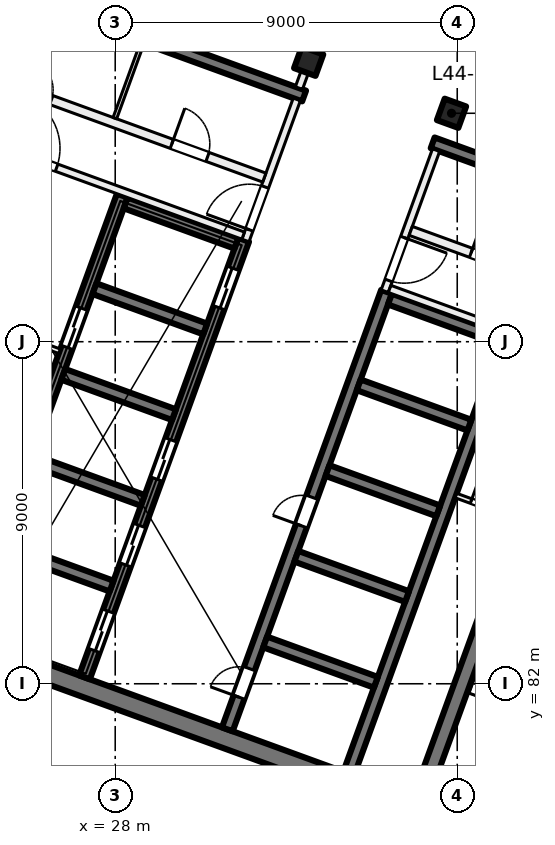
"""IFC4 building model, lengths in metres.
Left out: names, types, materials, properties, quantities, classifications, styles, units other than length and angle.
Written with IfcOpenShell. Run it as: python <this file> out.ifc"""

import sys

from ifc_helpers import new_model, si_unit, direction, frame, frame_2d, origin, origin_2d, place, context, subcontext, project, spatial, rectangle, extrude, element, fill, save


model = new_model("IFC4")
c1 = context("Model", 3, precision=1e-05, world=origin(), true_north=direction((0.0, 1.0)))
c2 = subcontext(c1, "Body", "Model", "MODEL_VIEW")
j1 = project(units=[si_unit("LENGTHUNIT", "METRE"), si_unit("PLANEANGLEUNIT", "RADIAN")], contexts=[c1])
p1 = place(None, origin())
s1 = spatial("IfcSite", under=j1, at=p1, CompositionType="ELEMENT")
p2 = place(p1, origin())
s2 = spatial("IfcBuilding", under=s1, at=p2, CompositionType="ELEMENT")
p3 = place(p2, frame((0.0, 0.0, 188.0)))
s3 = spatial("IfcBuildingStorey", under=s2, at=p3, CompositionType="ELEMENT", Elevation=188.0)
for number, where, z_axis, x_axis in (
    (1, (36.849, 97.011, 0.0), (0.0, 0.0, 1.0), (-0.342, -0.94, 0.0)),
    (2, (33.091, 98.379, 0.0), (0.0, 0.0, 1.0), (-0.342, -0.94, 0.0)),
):
    element("IfcColumn", number, at=place(p3, frame(where, z_axis=z_axis, x_axis=x_axis)), inside=s3, PredefinedType="COLUMN", context=c2, shape_type="SweptSolid", body=[
        extrude(rectangle(XDim=0.6, YDim=0.6, at=origin_2d()), origin(), (0.0, 0.0, 1.0), 4.0),
    ])
p4 = place(p3, frame((35.75, 78.788, 0.0), z_axis=(0.0, 0.0, 1.0), x_axis=(-0.939692894512, 0.342019391267, 0.0)))
e3 = element("IfcWall", 3, at=p4, inside=s3, PredefinedType="SHEAR", context=c2, shape_type="SweptSolid", body=[
    extrude(rectangle(XDim=14.4, YDim=0.5, at=frame_2d((7.2, 0.0))), origin(), (0.0, 0.0, 1.0), 4.0),
])
p5 = place(p3, frame((36.058, 79.048, 0.0), z_axis=(0.0, 0.0, 1.0), x_axis=(0.342016982193, 0.939693771338, 0.0)))
e4 = element("IfcWall", 4, at=p5, inside=s3, PredefinedType="SHEAR", context=c2, shape_type="SweptSolid", body=[
    extrude(rectangle(XDim=7.8, YDim=0.4, at=frame_2d((3.9, 0.0))), origin(), (0.0, 0.0, 1.0), 4.0),
])
p6 = place(p3, frame((30.949, 80.801, 0.0), z_axis=(0.0, 0.0, 1.0), x_axis=(0.342016684409, 0.939693879721, 0.0)))
e5 = element("IfcWall", 5, at=p6, inside=s3, PredefinedType="SHEAR", context=c2, shape_type="SweptSolid", body=[
    extrude(rectangle(XDim=12.25, YDim=0.3, at=frame_2d((6.125, 0.0))), origin(), (0.0, 0.0, 1.0), 4.0),
])
p7 = place(p6, frame((0.9, 0.0, 0.0)))
e6 = element("IfcOpeningElement", 6, at=p7, cuts=e5, PredefinedType="OPENING", context=c2, shape_type="SweptSolid", body=[
    extrude(rectangle(XDim=0.8, YDim=2.1, at=frame_2d((0.4, 1.05))), frame((0.0, 0.16, 0.0), z_axis=(0.0, -1.0, 0.0), x_axis=(1.0, 0.0, 0.0)), (0.0, 0.0, 1.0), 0.32),
])
p8 = place(p6, frame((5.7, 0.0, 0.0)))
e7 = element("IfcOpeningElement", 7, at=p8, cuts=e5, PredefinedType="OPENING", context=c2, shape_type="SweptSolid", body=[
    extrude(rectangle(XDim=0.8, YDim=2.1, at=frame_2d((0.4, 1.05))), frame((0.0, 0.16, 0.0), z_axis=(0.0, -1.0, 0.0), x_axis=(1.0, 0.0, 0.0)), (0.0, 0.0, 1.0), 0.32),
])
p9 = place(p3, frame((34.144, 79.638, 0.0), z_axis=(0.0, 0.0, 1.0), x_axis=(0.342016684409, 0.939693879721, 0.0)))
e8 = element("IfcWall", 8, at=p9, inside=s3, PredefinedType="SHEAR", context=c2, shape_type="SweptSolid", body=[
    extrude(rectangle(XDim=12.25, YDim=0.3, at=frame_2d((6.125, 0.0))), origin(), (0.0, 0.0, 1.0), 4.0),
])
p10 = place(p3, frame((34.858, 82.039, 0.0), z_axis=(0.0, 0.0, 1.0), x_axis=(-0.939689908313, 0.342027595692, 0.0)))
e9 = element("IfcWall", 9, at=p10, inside=s3, PredefinedType="SHEAR", context=c2, shape_type="SweptSolid", body=[
    extrude(rectangle(XDim=3.1, YDim=0.3, at=frame_2d((1.55, 0.0))), origin(), (0.0, 0.0, 1.0), 4.0),
])
p11 = place(p3, frame((35.679, 84.294, 0.0), z_axis=(0.0, 0.0, 1.0), x_axis=(-0.939706007505, 0.341983361377, 0.0)))
e10 = element("IfcWall", 10, at=p11, inside=s3, PredefinedType="SHEAR", context=c2, shape_type="SweptSolid", body=[
    extrude(rectangle(XDim=3.1, YDim=0.3, at=frame_2d((1.55, 0.0))), origin(), (0.0, 0.0, 1.0), 4.0),
])
for number, where, z_axis, x_axis in (
    (11, (36.5, 86.549, 0.0), (0.0, 0.0, 1.0), (-0.94, 0.342, 0.0)),
    (12, (37.321, 88.805, 0.0), (0.0, 0.0, 1.0), (-0.94, 0.342, 0.0)),
    (13, (38.142, 91.06, 0.0), (0.0, 0.0, 1.0), (-0.94, 0.342, 0.0)),
):
    element("IfcWall", number, at=place(p3, frame(where, z_axis=z_axis, x_axis=x_axis)), inside=s3, PredefinedType="SHEAR", context=c2, shape_type="SweptSolid", body=[
        extrude(rectangle(XDim=3.1, YDim=0.3, at=frame_2d((1.55, 0.0))), origin(), (0.0, 0.0, 1.0), 4.0),
    ])
p12 = place(p3, frame((27.191, 82.169, 0.0), z_axis=(0.0, 0.0, 1.0), x_axis=(0.342016684409, 0.939693879721, 0.0)))
e14 = element("IfcWall", 14, at=p12, inside=s3, PredefinedType="SHEAR", context=c2, shape_type="SweptSolid", body=[
    extrude(rectangle(XDim=12.25, YDim=0.3, at=frame_2d((6.125, 0.0))), origin(), (0.0, 0.0, 1.0), 4.0),
])
p13 = place(p12, frame((0.75, 0.0, 0.0)))
e15 = element("IfcOpeningElement", 15, at=p13, cuts=e14, PredefinedType="OPENING", context=c2, shape_type="SweptSolid", body=[
    extrude(rectangle(XDim=1.1, YDim=2.1, at=frame_2d((0.55, 1.05))), frame((0.0, 0.16, 0.0), z_axis=(0.0, -1.0, 0.0), x_axis=(1.0, 0.0, 0.0)), (0.0, 0.0, 1.0), 0.32),
])
p14 = place(p12, frame((3.15, 0.0, 0.0)))
e16 = element("IfcOpeningElement", 16, at=p14, cuts=e14, PredefinedType="OPENING", context=c2, shape_type="SweptSolid", body=[
    extrude(rectangle(XDim=1.1, YDim=2.1, at=frame_2d((0.55, 1.05))), frame((0.0, 0.16, 0.0), z_axis=(0.0, -1.0, 0.0), x_axis=(1.0, 0.0, 0.0)), (0.0, 0.0, 1.0), 0.32),
])
p15 = place(p12, frame((5.55, 0.0, 0.0)))
e17 = element("IfcOpeningElement", 17, at=p15, cuts=e14, PredefinedType="OPENING", context=c2, shape_type="SweptSolid", body=[
    extrude(rectangle(XDim=1.1, YDim=2.1, at=frame_2d((0.55, 1.05))), frame((0.0, 0.16, 0.0), z_axis=(0.0, -1.0, 0.0), x_axis=(1.0, 0.0, 0.0)), (0.0, 0.0, 1.0), 0.32),
])
p16 = place(p12, frame((10.35, 0.0, 0.0)))
e18 = element("IfcOpeningElement", 18, at=p16, cuts=e14, PredefinedType="OPENING", context=c2, shape_type="SweptSolid", body=[
    extrude(rectangle(XDim=1.1, YDim=2.1, at=frame_2d((0.55, 1.05))), frame((0.0, 0.16, 0.0), z_axis=(0.0, -1.0, 0.0), x_axis=(1.0, 0.0, 0.0)), (0.0, 0.0, 1.0), 0.32),
])
p17 = place(p3, frame((23.996, 83.332, 0.0), z_axis=(0.0, 0.0, 1.0), x_axis=(0.342016684409, 0.939693879721, 0.0)))
e19 = element("IfcWall", 19, at=p17, inside=s3, PredefinedType="SHEAR", context=c2, shape_type="SweptSolid", body=[
    extrude(rectangle(XDim=12.25, YDim=0.3, at=frame_2d((6.125, 0.0))), origin(), (0.0, 0.0, 1.0), 4.0),
])
p18 = place(p17, frame((8.0, 0.0, 0.0)))
e20 = element("IfcOpeningElement", 20, at=p18, cuts=e19, PredefinedType="OPENING", context=c2, shape_type="SweptSolid", body=[
    extrude(rectangle(XDim=1.1, YDim=2.1, at=frame_2d((0.55, 1.05))), frame((0.0, 0.16, 0.0), z_axis=(0.0, -1.0, 0.0), x_axis=(1.0, 0.0, 0.0)), (0.0, 0.0, 1.0), 0.32),
])
for number, where, z_axis, x_axis in (
    (21, (27.905, 84.57, 0.0), (0.0, 0.0, 1.0), (-0.94, 0.342, 0.0)),
    (22, (28.726, 86.825, 0.0), (0.0, 0.0, 1.0), (-0.94, 0.342, 0.0)),
    (23, (29.546, 89.08, 0.0), (0.0, 0.0, 1.0), (-0.94, 0.342, 0.0)),
):
    element("IfcWall", number, at=place(p3, frame(where, z_axis=z_axis, x_axis=x_axis)), inside=s3, PredefinedType="SHEAR", context=c2, shape_type="SweptSolid", body=[
        extrude(rectangle(XDim=3.1, YDim=0.3, at=frame_2d((1.55, 0.0))), origin(), (0.0, 0.0, 1.0), 4.0),
    ])
for number, where, z_axis, x_axis in (
    (24, (30.367, 91.336, 0.0), (0.0, 0.0, 1.0), (-0.94, 0.342, 0.0)),
    (25, (31.188, 93.591, 0.0), (0.0, 0.0, 1.0), (-0.94, 0.342, 0.0)),
):
    element("IfcWall", number, at=place(p3, frame(where, z_axis=z_axis, x_axis=x_axis)), inside=s3, PredefinedType="SHEAR", context=c2, shape_type="SweptSolid", body=[
        extrude(rectangle(XDim=3.1, YDim=0.3, at=frame_2d((1.55, 0.0))), origin(), (0.0, 0.0, 1.0), 4.0),
    ])
p19 = place(p3, frame((44.529, 93.258, 0.0), z_axis=(0.0, 0.0, 1.0), x_axis=(-0.9396917844, 0.342022441267, 0.0)))
e26 = element("IfcWall", 26, at=p19, inside=s3, PredefinedType="SHEAR", context=c2, shape_type="SweptSolid", body=[
    extrude(rectangle(XDim=8.7, YDim=0.3, at=frame_2d((4.35, 0.0))), origin(), (0.0, 0.0, 1.0), 4.0),
])
p20 = place(p3, frame((32.971, 97.465, 0.0), z_axis=(0.0, 0.0, 1.0), x_axis=(-0.939695066972, 0.34201342241, 0.0)))
e27 = element("IfcWall", 27, at=p20, inside=s3, PredefinedType="SHEAR", context=c2, shape_type="SweptSolid", body=[
    extrude(rectangle(XDim=8.7, YDim=0.3, at=frame_2d((4.35, 0.0))), origin(), (0.0, 0.0, 1.0), 4.0),
])
p21 = place(p3, frame((31.427, 93.663, 0.0), z_axis=(0.0, 0.0, 1.0), x_axis=(0.342030870568, 0.93968871632, 0.0)))
e28 = element("IfcWall", 28, at=p21, inside=s3, PredefinedType="PARTITIONING", context=c2, shape_type="SweptSolid", body=[
    extrude(rectangle(XDim=3.95, YDim=0.2, at=frame_2d((1.975, 0.0))), origin(), (0.0, 0.0, 1.0), 3.625),
])
p22 = place(p21, frame((0.3, 0.0, 0.0)))
e29 = element("IfcOpeningElement", 29, at=p22, cuts=e28, PredefinedType="OPENING", context=c2, shape_type="SweptSolid", body=[
    extrude(rectangle(XDim=1.2, YDim=2.1, at=frame_2d((0.6, 1.05))), frame((0.0, 0.11, 0.0), z_axis=(0.0, -1.0, 0.0), x_axis=(1.0, 0.0, 0.0)), (0.0, 0.0, 1.0), 0.22),
])
p23 = place(p3, frame((23.427, 96.682, 0.0), z_axis=(0.0, 0.0, 1.0), x_axis=(0.939690465531, -0.342026064782, 0.0)))
e30 = element("IfcWall", 30, at=p23, inside=s3, PredefinedType="PARTITIONING", context=c2, shape_type="SweptSolid", body=[
    extrude(rectangle(XDim=8.45, YDim=0.2, at=frame_2d((4.225, 0.0))), origin(), (0.0, 0.0, 1.0), 3.625),
])
p24 = place(p23, frame((1.725, 0.0, 0.0)))
e31 = element("IfcOpeningElement", 31, at=p24, cuts=e30, PredefinedType="OPENING", context=c2, shape_type="SweptSolid", body=[
    extrude(rectangle(XDim=1.5, YDim=2.1, at=frame_2d((0.75, 1.05))), frame((0.0, 0.11, 0.0), z_axis=(0.0, -1.0, 0.0), x_axis=(1.0, 0.0, 0.0)), (0.0, 0.0, 1.0), 0.22),
])
p25 = place(p3, frame((23.983, 98.208, 0.0), z_axis=(0.0, 0.0, 1.0), x_axis=(0.939699751196, -0.342000552051, 0.0)))
e32 = element("IfcWall", 32, at=p25, inside=s3, PredefinedType="PARTITIONING", context=c2, shape_type="SweptSolid", body=[
    extrude(rectangle(XDim=8.45, YDim=0.25, at=frame_2d((4.225, 0.0))), origin(), (0.0, 0.0, 1.0), 3.625),
])
p26 = place(p25, frame((5.86, 0.0, 0.0)))
e33 = element("IfcOpeningElement", 33, at=p26, cuts=e32, PredefinedType="OPENING", context=c2, shape_type="SweptSolid", body=[
    extrude(rectangle(XDim=1.0, YDim=2.1, at=frame_2d((0.5, 1.05))), frame((0.0, 0.135, 0.0), z_axis=(0.0, -1.0, 0.0), x_axis=(1.0, 0.0, 0.0)), (0.0, 0.0, 1.0), 0.27),
])
p27 = place(p25, frame((1.685, 0.0, 0.0)))
e34 = element("IfcOpeningElement", 34, at=p27, cuts=e32, PredefinedType="OPENING", context=c2, shape_type="SweptSolid", body=[
    extrude(rectangle(XDim=0.8, YDim=2.1, at=frame_2d((0.4, 1.05))), frame((0.0, 0.135, 0.0), z_axis=(0.0, -1.0, 0.0), x_axis=(1.0, 0.0, 0.0)), (0.0, 0.0, 1.0), 0.27),
])
p28 = place(p3, frame((24.985, 91.312, 0.0), z_axis=(0.0, 0.0, 1.0), x_axis=(0.939719959755, -0.341945020783, 0.0)))
e35 = element("IfcWall", 35, at=p28, inside=s3, PredefinedType="PARTITIONING", context=c2, shape_type="SweptSolid", body=[
    extrude(rectangle(XDim=1.65, YDim=0.125, at=frame_2d((0.825, 0.0))), origin(), (0.0, 0.0, 1.0), 3.625),
])
p29 = place(p28, frame((0.425, 0.0, 0.0)))
e36 = element("IfcOpeningElement", 36, at=p29, cuts=e35, PredefinedType="OPENING", context=c2, shape_type="SweptSolid", body=[
    extrude(rectangle(XDim=0.8, YDim=2.1, at=frame_2d((0.4, 1.05))), frame((0.0, 0.073, 0.0), z_axis=(0.0, -1.0, 0.0), x_axis=(1.0, 0.0, 0.0)), (0.0, 0.0, 1.0), 0.145),
])
p30 = place(p3, frame((27.991, 96.883, 0.0), z_axis=(0.0, 0.0, 1.0), x_axis=(0.342023078919, 0.939691552312, 0.0)))
e37 = element("IfcWall", 37, at=p30, inside=s3, PredefinedType="PARTITIONING", context=c2, shape_type="SweptSolid", body=[
    extrude(rectangle(XDim=2.1, YDim=0.1, at=frame_2d((1.05, 0.0))), origin(), (0.0, 0.0, 1.0), 3.625),
])
p31 = place(p3, frame((36.443, 96.041, 0.0), z_axis=(0.0, 0.0, 1.0), x_axis=(-0.341996156931, -0.939701350773, 0.0)))
e38 = element("IfcWall", 38, at=p31, inside=s3, PredefinedType="PARTITIONING", context=c2, shape_type="SweptSolid", body=[
    extrude(rectangle(XDim=3.95, YDim=0.2, at=frame_2d((1.975, 0.0))), origin(), (0.0, 0.0, 1.0), 3.625),
])
p32 = place(p31, frame((2.45, 0.0, 0.0)))
e39 = element("IfcOpeningElement", 39, at=p32, cuts=e38, PredefinedType="OPENING", context=c2, shape_type="SweptSolid", body=[
    extrude(rectangle(XDim=1.2, YDim=2.1, at=frame_2d((0.6, 1.05))), frame((0.0, 0.11, 0.0), z_axis=(0.0, -1.0, 0.0), x_axis=(1.0, 0.0, 0.0)), (0.0, 0.0, 1.0), 0.22),
])
p33 = place(p3, frame((35.22, 92.389, 0.0), z_axis=(0.0, 0.0, 1.0), x_axis=(0.939690465531, -0.342026064782, 0.0)))
e40 = element("IfcWall", 40, at=p33, inside=s3, PredefinedType="PARTITIONING", context=c2, shape_type="SweptSolid", body=[
    extrude(rectangle(XDim=8.45, YDim=0.2, at=frame_2d((4.225, 0.0))), origin(), (0.0, 0.0, 1.0), 3.625),
])
p34 = place(p33, frame((5.225, 0.0, 0.0)))
e41 = element("IfcOpeningElement", 41, at=p34, cuts=e40, PredefinedType="OPENING", context=c2, shape_type="SweptSolid", body=[
    extrude(rectangle(XDim=1.5, YDim=2.1, at=frame_2d((0.75, 1.05))), frame((0.0, 0.11, 0.0), z_axis=(0.0, -1.0, 0.0), x_axis=(1.0, 0.0, 0.0)), (0.0, 0.0, 1.0), 0.22),
])
p35 = place(p3, frame((35.776, 93.916, 0.0), z_axis=(0.0, 0.0, 1.0), x_axis=(0.939690465531, -0.342026064782, 0.0)))
e42 = element("IfcWall", 42, at=p35, inside=s3, PredefinedType="PARTITIONING", context=c2, shape_type="SweptSolid", body=[
    extrude(rectangle(XDim=8.45, YDim=0.25, at=frame_2d((4.225, 0.0))), origin(), (0.0, 0.0, 1.0), 3.625),
])
p36 = place(p35, frame((1.69, 0.0, 0.0)))
e43 = element("IfcOpeningElement", 43, at=p36, cuts=e42, PredefinedType="OPENING", context=c2, shape_type="SweptSolid", body=[
    extrude(rectangle(XDim=0.8, YDim=2.1, at=frame_2d((0.4, 1.05))), frame((0.0, 0.135, 0.0), z_axis=(0.0, -1.0, 0.0), x_axis=(1.0, 0.0, 0.0)), (0.0, 0.0, 1.0), 0.27),
])
p37 = place(p35, frame((5.865, 0.0, 0.0)))
e44 = element("IfcOpeningElement", 44, at=p37, cuts=e42, PredefinedType="OPENING", context=c2, shape_type="SweptSolid", body=[
    extrude(rectangle(XDim=1.0, YDim=2.1, at=frame_2d((0.5, 1.05))), frame((0.0, 0.135, 0.0), z_axis=(0.0, -1.0, 0.0), x_axis=(1.0, 0.0, 0.0)), (0.0, 0.0, 1.0), 0.27),
])
p38 = place(p3, frame((36.966, 86.952, 0.0), z_axis=(0.0, 0.0, 1.0), x_axis=(0.939672407396, -0.342075674051, 0.0)))
e45 = element("IfcWall", 45, at=p38, inside=s3, PredefinedType="PARTITIONING", context=c2, shape_type="SweptSolid", body=[
    extrude(rectangle(XDim=1.65, YDim=0.125, at=frame_2d((0.825, 0.0))), origin(), (0.0, 0.0, 1.0), 3.625),
])
p39 = place(p38, frame((0.425, 0.0, 0.0)))
e46 = element("IfcOpeningElement", 46, at=p39, cuts=e45, PredefinedType="OPENING", context=c2, shape_type="SweptSolid", body=[
    extrude(rectangle(XDim=0.8, YDim=2.1, at=frame_2d((0.4, 1.05))), frame((0.0, 0.073, 0.0), z_axis=(0.0, -1.0, 0.0), x_axis=(1.0, 0.0, 0.0)), (0.0, 0.0, 1.0), 0.145),
])
p40 = place(p3, frame((32.834, 97.674, 0.0), z_axis=(0.0, 0.0, 1.0), x_axis=(0.342017493073, 0.939693585395, 0.0)))
e47 = element("IfcWall", 47, at=p40, inside=s3, PredefinedType="PARTITIONING", context=c2, shape_type="SweptSolid", body=[
    extrude(rectangle(XDim=3.5, YDim=0.2, at=frame_2d((1.75, 0.0))), origin(), (0.0, 0.0, 1.0), 3.625),
])
p41 = place(p3, frame((34.091, 100.835, 0.0), z_axis=(0.0, 0.0, 1.0), x_axis=(0.939702148643, -0.341993964619, 0.0)))
e48 = element("IfcWall", 48, at=p41, inside=s3, PredefinedType="PARTITIONING", context=c2, shape_type="SweptSolid", body=[
    extrude(rectangle(XDim=10.0, YDim=0.2, at=frame_2d((5.0, 0.0))), origin(), (0.0, 0.0, 1.0), 3.625),
])
p42 = place(p41, frame((4.4, 0.0, 0.0)))
e49 = element("IfcOpeningElement", 49, at=p42, cuts=e48, PredefinedType="OPENING", context=c2, shape_type="SweptSolid", body=[
    extrude(rectangle(XDim=1.0, YDim=2.1, at=frame_2d((0.5, 1.05))), frame((0.0, 0.11, 0.0), z_axis=(0.0, -1.0, 0.0), x_axis=(1.0, 0.0, 0.0)), (0.0, 0.0, 1.0), 0.22),
])
p43 = place(p13, origin())
e50 = element("IfcDoor", 50, at=p43, inside=s3, OperationType="DOUBLE_DOOR_SLIDING", PredefinedType="DOOR", context=c2, shape_type="SweptSolid", body=[
    extrude(rectangle(XDim=1.1, YDim=2.1, at=frame_2d((0.55, 1.05))), frame((0.0, 0.025, 0.0), z_axis=(0.0, -1.0, 0.0), x_axis=(1.0, 0.0, 0.0)), (0.0, 0.0, 1.0), 0.05),
])
fill(e15, e50)
p44 = place(p14, origin())
e51 = element("IfcDoor", 51, at=p44, inside=s3, OperationType="DOUBLE_DOOR_SLIDING", PredefinedType="DOOR", context=c2, shape_type="SweptSolid", body=[
    extrude(rectangle(XDim=1.1, YDim=2.1, at=frame_2d((0.55, 1.05))), frame((0.0, 0.025, 0.0), z_axis=(0.0, -1.0, 0.0), x_axis=(1.0, 0.0, 0.0)), (0.0, 0.0, 1.0), 0.05),
])
fill(e16, e51)
p45 = place(p15, origin())
e52 = element("IfcDoor", 52, at=p45, inside=s3, OperationType="DOUBLE_DOOR_SLIDING", PredefinedType="DOOR", context=c2, shape_type="SweptSolid", body=[
    extrude(rectangle(XDim=1.1, YDim=2.1, at=frame_2d((0.55, 1.05))), frame((0.0, 0.025, 0.0), z_axis=(0.0, -1.0, 0.0), x_axis=(1.0, 0.0, 0.0)), (0.0, 0.0, 1.0), 0.05),
])
fill(e17, e52)
p46 = place(p16, origin())
e53 = element("IfcDoor", 53, at=p46, inside=s3, OperationType="DOUBLE_DOOR_SLIDING", PredefinedType="DOOR", context=c2, shape_type="SweptSolid", body=[
    extrude(rectangle(XDim=1.1, YDim=2.1, at=frame_2d((0.55, 1.05))), frame((0.0, 0.025, 0.0), z_axis=(0.0, -1.0, 0.0), x_axis=(1.0, 0.0, 0.0)), (0.0, 0.0, 1.0), 0.05),
])
fill(e18, e53)
p47 = place(p7, origin())
e54 = element("IfcDoor", 54, at=p47, inside=s3, OperationType="SINGLE_SWING_LEFT", PredefinedType="DOOR", context=c2, shape_type="SweptSolid", body=[
    extrude(rectangle(XDim=0.8, YDim=2.1, at=frame_2d((0.4, 1.05))), frame((0.0, 0.025, 0.0), z_axis=(0.0, -1.0, 0.0), x_axis=(1.0, 0.0, 0.0)), (0.0, 0.0, 1.0), 0.05),
])
fill(e6, e54)
p48 = place(p8, origin())
e55 = element("IfcDoor", 55, at=p48, inside=s3, OperationType="SINGLE_SWING_RIGHT", PredefinedType="DOOR", context=c2, shape_type="SweptSolid", body=[
    extrude(rectangle(XDim=0.8, YDim=2.1, at=frame_2d((0.4, 1.05))), frame((0.0, 0.025, 0.0), z_axis=(0.0, -1.0, 0.0), x_axis=(1.0, 0.0, 0.0)), (0.0, 0.0, 1.0), 0.05),
])
fill(e7, e55)
p49 = place(p22, origin())
e56 = element("IfcDoor", 56, at=p49, inside=s3, OperationType="DOUBLE_DOOR_SINGLE_SWING", PredefinedType="DOOR", context=c2, shape_type="SweptSolid", body=[
    extrude(rectangle(XDim=1.2, YDim=2.1, at=frame_2d((0.6, 1.05))), frame((0.0, 0.025, 0.0), z_axis=(0.0, -1.0, 0.0), x_axis=(1.0, 0.0, 0.0)), (0.0, 0.0, 1.0), 0.05),
])
fill(e29, e56)
p50 = place(p24, origin())
e57 = element("IfcDoor", 57, at=p50, inside=s3, OperationType="DOUBLE_DOOR_SINGLE_SWING", PredefinedType="DOOR", context=c2, shape_type="SweptSolid", body=[
    extrude(rectangle(XDim=1.5, YDim=2.1, at=frame_2d((0.75, 1.05))), frame((0.0, 0.025, 0.0), z_axis=(0.0, -1.0, 0.0), x_axis=(1.0, 0.0, 0.0)), (0.0, 0.0, 1.0), 0.05),
])
fill(e31, e57)
p51 = place(p26, origin())
e58 = element("IfcDoor", 58, at=p51, inside=s3, OperationType="SINGLE_SWING_LEFT", PredefinedType="DOOR", context=c2, shape_type="SweptSolid", body=[
    extrude(rectangle(XDim=1.0, YDim=2.1, at=frame_2d((0.5, 1.05))), frame((0.0, 0.025, 0.0), z_axis=(0.0, -1.0, 0.0), x_axis=(1.0, 0.0, 0.0)), (0.0, 0.0, 1.0), 0.05),
])
fill(e33, e58)
p52 = place(p32, origin())
e59 = element("IfcDoor", 59, at=p52, inside=s3, OperationType="DOUBLE_DOOR_SINGLE_SWING", PredefinedType="DOOR", context=c2, shape_type="SweptSolid", body=[
    extrude(rectangle(XDim=1.2, YDim=2.1, at=frame_2d((0.6, 1.05))), frame((0.0, 0.025, 0.0), z_axis=(0.0, -1.0, 0.0), x_axis=(1.0, 0.0, 0.0)), (0.0, 0.0, 1.0), 0.05),
])
fill(e39, e59)
p53 = place(p39, origin())
e60 = element("IfcDoor", 60, at=p53, inside=s3, OperationType="SINGLE_SWING_LEFT", PredefinedType="DOOR", context=c2, shape_type="SweptSolid", body=[
    extrude(rectangle(XDim=0.8, YDim=2.1, at=frame_2d((0.4, 1.05))), frame((0.0, 0.025, 0.0), z_axis=(0.0, -1.0, 0.0), x_axis=(1.0, 0.0, 0.0)), (0.0, 0.0, 1.0), 0.05),
])
fill(e46, e60)
p54 = place(p36, origin())
e61 = element("IfcDoor", 61, at=p54, inside=s3, OperationType="SINGLE_SWING_RIGHT", PredefinedType="DOOR", context=c2, shape_type="SweptSolid", body=[
    extrude(rectangle(XDim=0.8, YDim=2.1, at=frame_2d((0.4, 1.05))), frame((0.0, 0.025, 0.0), z_axis=(0.0, -1.0, 0.0), x_axis=(1.0, 0.0, 0.0)), (0.0, 0.0, 1.0), 0.05),
])
fill(e43, e61)
p55 = place(p18, origin())
e62 = element("IfcDoor", 62, at=p55, inside=s3, OperationType="DOUBLE_DOOR_SLIDING", PredefinedType="DOOR", context=c2, shape_type="SweptSolid", body=[
    extrude(rectangle(XDim=1.1, YDim=2.1, at=frame_2d((0.55, 1.05))), frame((0.0, 0.025, 0.0), z_axis=(0.0, -1.0, 0.0), x_axis=(1.0, 0.0, 0.0)), (0.0, 0.0, 1.0), 0.05),
])
fill(e20, e62)
save(model, sys.argv[1])
